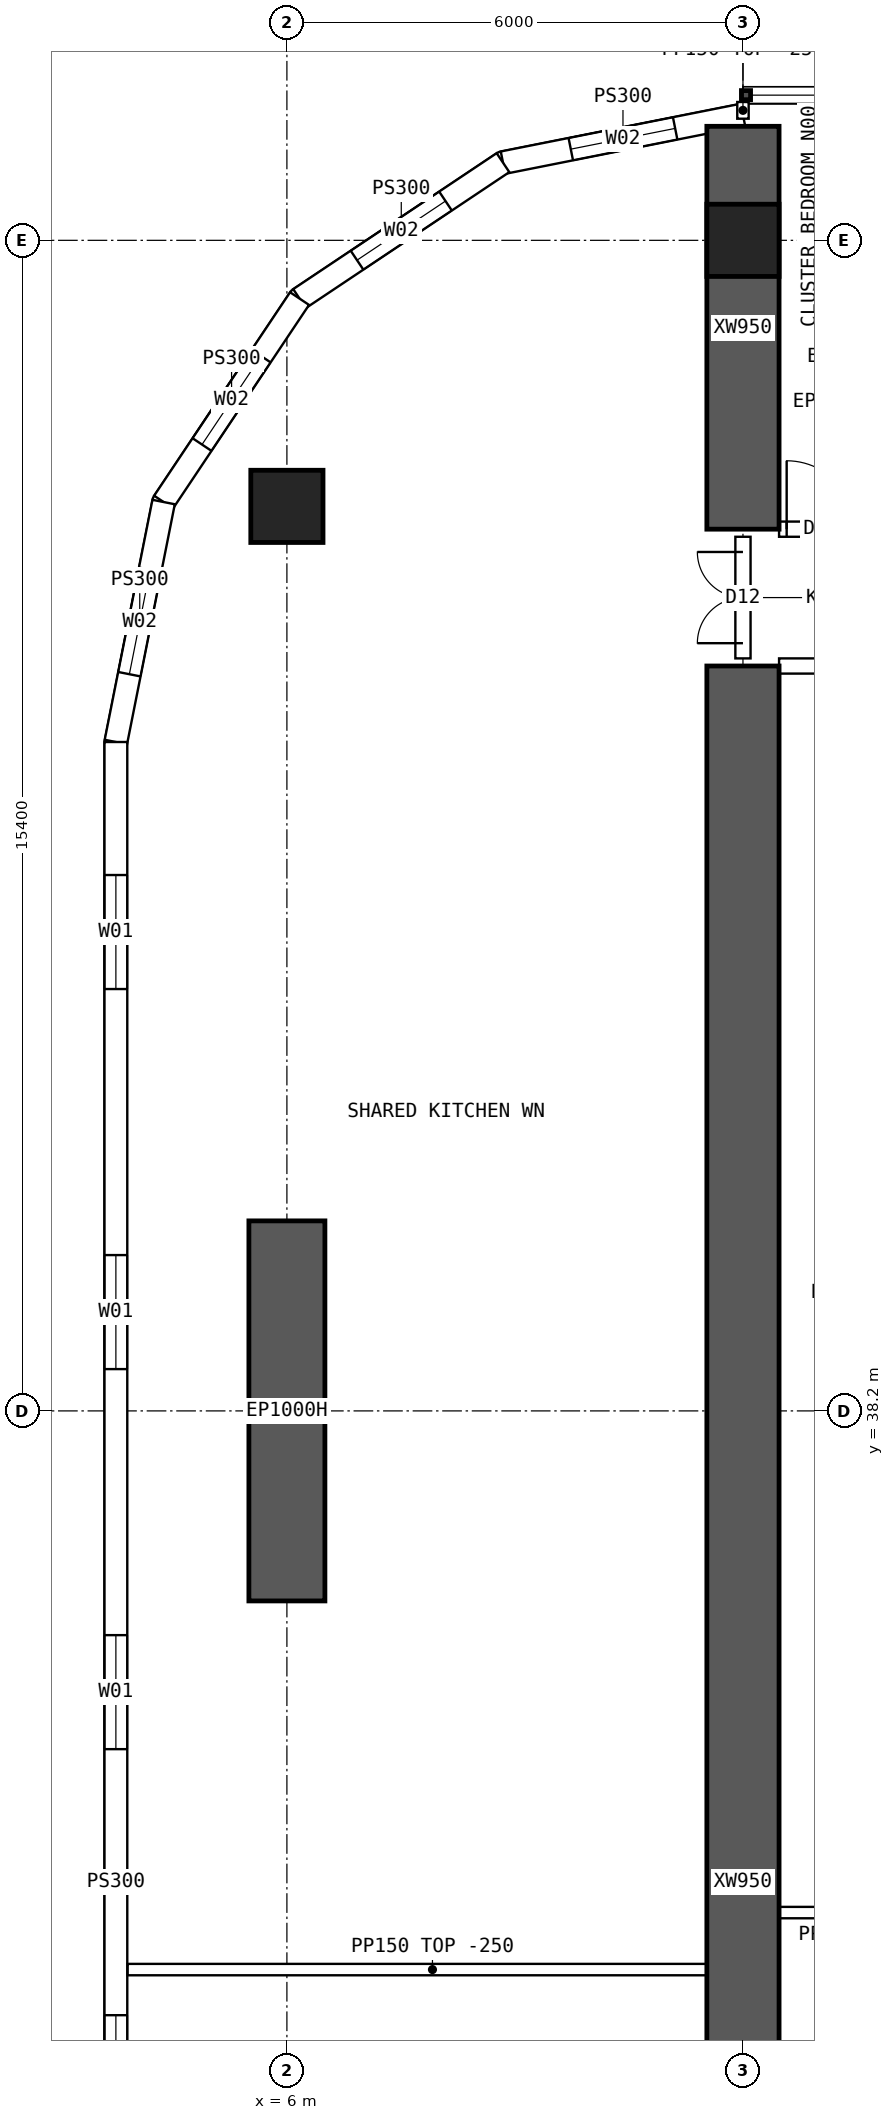
"""IFC4 building model, lengths in metres.
Left out: names, types, materials, properties, quantities, classifications, styles, units other than length and angle.
Written with IfcOpenShell. Run it as: python <this file> out.ifc"""

import sys

from ifc_helpers import new_model, si_unit, direction, frame, frame_2d, origin, origin_2d, place, context, subcontext, project, spatial, polyline, rectangle, hollow_rectangle, outline, extrude, element, fill, save


model = new_model("IFC4")
c1 = context("Model", 3, precision=1e-05, world=origin(), true_north=direction((0.0, 1.0)))
c2 = subcontext(c1, "Body", "Model", "MODEL_VIEW")
j1 = project(units=[si_unit("LENGTHUNIT", "METRE"), si_unit("PLANEANGLEUNIT", "RADIAN")], contexts=[c1])
p1 = place(None, origin())
s1 = spatial("IfcSite", under=j1, at=p1, CompositionType="ELEMENT")
p2 = place(p1, origin())
s2 = spatial("IfcBuilding", under=s1, at=p2, CompositionType="ELEMENT")
p3 = place(p2, frame((0.0, 0.0, 121.9)))
s3 = spatial("IfcBuildingStorey", under=s2, at=p3, CompositionType="ELEMENT", Elevation=121.9)
for number, where, z_axis, x_axis in (
    (1, (12.0, 53.6, 0.0), (0.0, 0.0, 1.0), (1.0, 0.0, 0.0)),
    (2, (6.0, 50.1, 0.0), (0.0, 0.0, 1.0), (1.0, 0.0, 0.0)),
):
    element("IfcColumn", number, at=place(p3, frame(where, z_axis=z_axis, x_axis=x_axis)), inside=s3, PredefinedType="COLUMN", context=c2, shape_type="SweptSolid", body=[
        extrude(hollow_rectangle(XDim=0.95, YDim=0.95, WallThickness=0.095, at=origin_2d()), origin(), (0.0, 0.0, 1.0), 3.75),
    ])
p4 = place(p3, frame((6.0, 35.7, 0.0), z_axis=(0.0, 0.0, 1.0), x_axis=(0.0, 1.0, 0.0)))
e3 = element("IfcWall", 3, at=p4, inside=s3, PredefinedType="SHEAR", context=c2, shape_type="SweptSolid", body=[
    extrude(rectangle(XDim=5.0, YDim=1.0, at=frame_2d((2.5, 0.0))), origin(), (0.0, 0.0, 1.0), 3.75),
])
p5 = place(p3, frame((12.0, 49.8, 0.0), z_axis=(0.0, 0.0, 1.0), x_axis=(0.0, 1.0, 0.0)))
e4 = element("IfcWall", 4, at=p5, inside=s3, PredefinedType="SHEAR", context=c2, shape_type="SweptSolid", body=[
    extrude(rectangle(XDim=5.3, YDim=0.95, at=frame_2d((2.65, 0.0))), origin(), (0.0, 0.0, 1.0), 3.75),
])
p6 = place(p3, frame((12.0, 16.0, 0.0), z_axis=(0.0, 0.0, 1.0), x_axis=(0.0, 1.0, 0.0)))
e5 = element("IfcWall", 5, at=p6, inside=s3, PredefinedType="SHEAR", context=c2, shape_type="SweptSolid", body=[
    extrude(rectangle(XDim=32.0, YDim=0.95, at=frame_2d((16.0, 0.0))), origin(), (0.0, 0.0, 1.0), 3.75),
])
p7 = place(p3, frame((3.75, 47.0, 0.0), z_axis=(0.0, 0.0, 1.0), x_axis=(0.0, -1.0, 0.0)))
e6 = element("IfcWall", 6, at=p7, inside=s3, PredefinedType="SOLIDWALL", context=c2, shape_type="SweptSolid", body=[
    extrude(outline(polyline([(-0.015, -0.15), (30.015, -0.15), (29.985, 0.15), (0.015, 0.15), (-0.015, -0.15)])), origin(), (0.0, 0.0, 1.0), 3.5),
])
p8 = place(p7, frame((1.75, 0.0, 0.9)))
e7 = element("IfcOpeningElement", 7, at=p8, cuts=e6, PredefinedType="OPENING", context=c2, shape_type="SweptSolid", body=[
    extrude(rectangle(XDim=1.5, YDim=2.0, at=frame_2d((0.75, 1.0))), frame((0.0, 0.16, 0.0), z_axis=(0.0, -1.0, 0.0), x_axis=(1.0, 0.0, 0.0)), (0.0, 0.0, 1.0), 0.32),
])
p9 = place(p7, frame((6.75, 0.0, 0.9)))
e8 = element("IfcOpeningElement", 8, at=p9, cuts=e6, PredefinedType="OPENING", context=c2, shape_type="SweptSolid", body=[
    extrude(rectangle(XDim=1.5, YDim=2.0, at=frame_2d((0.75, 1.0))), frame((0.0, 0.16, 0.0), z_axis=(0.0, -1.0, 0.0), x_axis=(1.0, 0.0, 0.0)), (0.0, 0.0, 1.0), 0.32),
])
p10 = place(p7, frame((11.75, 0.0, 0.9)))
e9 = element("IfcOpeningElement", 9, at=p10, cuts=e6, PredefinedType="OPENING", context=c2, shape_type="SweptSolid", body=[
    extrude(rectangle(XDim=1.5, YDim=2.0, at=frame_2d((0.75, 1.0))), frame((0.0, 0.16, 0.0), z_axis=(0.0, -1.0, 0.0), x_axis=(1.0, 0.0, 0.0)), (0.0, 0.0, 1.0), 0.32),
])
p11 = place(p7, frame((16.75, 0.0, 0.9)))
e10 = element("IfcOpeningElement", 10, at=p11, cuts=e6, PredefinedType="OPENING", context=c2, shape_type="SweptSolid", body=[
    extrude(rectangle(XDim=1.5, YDim=2.0, at=frame_2d((0.75, 1.0))), frame((0.0, 0.16, 0.0), z_axis=(0.0, -1.0, 0.0), x_axis=(1.0, 0.0, 0.0)), (0.0, 0.0, 1.0), 0.32),
])
p12 = place(p7, frame((21.75, 0.0, 0.9)))
e11 = element("IfcOpeningElement", 11, at=p12, cuts=e6, PredefinedType="OPENING", context=c2, shape_type="SweptSolid", body=[
    extrude(rectangle(XDim=1.5, YDim=2.0, at=frame_2d((0.75, 1.0))), frame((0.0, 0.16, 0.0), z_axis=(0.0, -1.0, 0.0), x_axis=(1.0, 0.0, 0.0)), (0.0, 0.0, 1.0), 0.32),
])
p13 = place(p7, frame((26.75, 0.0, 0.9)))
e12 = element("IfcOpeningElement", 12, at=p13, cuts=e6, PredefinedType="OPENING", context=c2, shape_type="SweptSolid", body=[
    extrude(rectangle(XDim=1.5, YDim=2.0, at=frame_2d((0.75, 1.0))), frame((0.0, 0.16, 0.0), z_axis=(0.0, -1.0, 0.0), x_axis=(1.0, 0.0, 0.0)), (0.0, 0.0, 1.0), 0.32),
])
p14 = place(p3, frame((12.0, 55.25, 0.0), z_axis=(0.0, 0.0, 1.0), x_axis=(-0.980787251524, -0.195080412259, 0.0)))
e13 = element("IfcWall", 13, at=p14, inside=s3, PredefinedType="SOLIDWALL", context=c2, shape_type="SweptSolid", body=[
    extrude(outline(polyline([(-0.03, -0.15), (3.249, -0.15), (3.189, 0.15), (0.03, 0.15), (-0.03, -0.15)])), origin(), (0.0, 0.0, 1.0), 3.5),
])
p15 = place(p14, frame((0.909, 0.0, 0.9)))
e14 = element("IfcOpeningElement", 14, at=p15, cuts=e13, PredefinedType="OPENING", context=c2, shape_type="SweptSolid", body=[
    extrude(rectangle(XDim=1.4, YDim=1.8, at=frame_2d((0.7, 0.9))), frame((0.0, 0.16, 0.0), z_axis=(0.0, -1.0, 0.0), x_axis=(1.0, 0.0, 0.0)), (0.0, 0.0, 1.0), 0.32),
])
p16 = place(p3, frame((8.843, 54.622, 0.0), z_axis=(0.0, 0.0, 1.0), x_axis=(-0.831443069936, -0.555609954424, 0.0)))
e15 = element("IfcWall", 15, at=p16, inside=s3, PredefinedType="SOLIDWALL", context=c2, shape_type="SweptSolid", body=[
    extrude(outline(polyline([(-0.03, -0.15), (3.249, -0.15), (3.189, 0.15), (0.03, 0.15), (-0.03, -0.15)])), origin(), (0.0, 0.0, 1.0), 3.5),
])
p17 = place(p16, frame((0.909, 0.0, 0.9)))
e16 = element("IfcOpeningElement", 16, at=p17, cuts=e15, PredefinedType="OPENING", context=c2, shape_type="SweptSolid", body=[
    extrude(rectangle(XDim=1.4, YDim=1.8, at=frame_2d((0.7, 0.9))), frame((0.0, 0.16, 0.0), z_axis=(0.0, -1.0, 0.0), x_axis=(1.0, 0.0, 0.0)), (0.0, 0.0, 1.0), 0.32),
])
p18 = place(p3, frame((6.167, 52.833, 0.0), z_axis=(0.0, 0.0, 1.0), x_axis=(-0.555609954424, -0.831443069936, 0.0)))
e17 = element("IfcWall", 17, at=p18, inside=s3, PredefinedType="SOLIDWALL", context=c2, shape_type="SweptSolid", body=[
    extrude(outline(polyline([(-0.03, -0.15), (3.249, -0.15), (3.189, 0.15), (0.03, 0.15), (-0.03, -0.15)])), origin(), (0.0, 0.0, 1.0), 3.5),
])
p19 = place(p18, frame((0.909, 0.0, 0.9)))
e18 = element("IfcOpeningElement", 18, at=p19, cuts=e17, PredefinedType="OPENING", context=c2, shape_type="SweptSolid", body=[
    extrude(rectangle(XDim=1.4, YDim=1.8, at=frame_2d((0.7, 0.9))), frame((0.0, 0.16, 0.0), z_axis=(0.0, -1.0, 0.0), x_axis=(1.0, 0.0, 0.0)), (0.0, 0.0, 1.0), 0.32),
])
p20 = place(p3, frame((4.378, 50.157, 0.0), z_axis=(0.0, 0.0, 1.0), x_axis=(-0.195080412259, -0.980787251524, 0.0)))
e19 = element("IfcWall", 19, at=p20, inside=s3, PredefinedType="SOLIDWALL", context=c2, shape_type="SweptSolid", body=[
    extrude(outline(polyline([(-0.03, -0.15), (3.234, -0.15), (3.204, 0.15), (0.03, 0.15), (-0.03, -0.15)])), origin(), (0.0, 0.0, 1.0), 3.5),
])
p21 = place(p20, frame((0.909, 0.0, 0.9)))
e20 = element("IfcOpeningElement", 20, at=p21, cuts=e19, PredefinedType="OPENING", context=c2, shape_type="SweptSolid", body=[
    extrude(rectangle(XDim=1.4, YDim=1.8, at=frame_2d((0.7, 0.9))), frame((0.0, 0.16, 0.0), z_axis=(0.0, -1.0, 0.0), x_axis=(1.0, 0.0, 0.0)), (0.0, 0.0, 1.0), 0.32),
])
p22 = place(p3, frame((12.475, 49.8, 0.0), z_axis=(0.0, 0.0, 1.0), x_axis=(1.0, 0.0, 0.0)))
e21 = element("IfcWall", 21, at=p22, inside=s3, PredefinedType="SOLIDWALL", context=c2, shape_type="SweptSolid", body=[
    extrude(outline(polyline([(0.0, 0.0), (5.05, 0.0), (5.05, 3.1), (0.0, 3.1), (0.0, 0.0)])), frame((0.0, 0.1, 0.0), z_axis=(0.0, -1.0, 0.0), x_axis=(1.0, 0.0, 0.0)), (0.0, 0.0, 1.0), 0.2),
])
p23 = place(p22, frame((0.1, 0.0, 0.0)))
e22 = element("IfcOpeningElement", 22, at=p23, cuts=e21, PredefinedType="OPENING", context=c2, shape_type="SweptSolid", body=[
    extrude(rectangle(XDim=0.9, YDim=2.1, at=frame_2d((0.45, 1.05))), frame((0.0, 0.11, 0.0), z_axis=(0.0, -1.0, 0.0), x_axis=(1.0, 0.0, 0.0)), (0.0, 0.0, 1.0), 0.22),
])
p24 = place(p22, frame((3.9, 0.0, 0.0)))
e23 = element("IfcOpeningElement", 23, at=p24, cuts=e21, PredefinedType="OPENING", context=c2, shape_type="SweptSolid", body=[
    extrude(rectangle(XDim=0.9, YDim=2.1, at=frame_2d((0.45, 1.05))), frame((0.0, 0.11, 0.0), z_axis=(0.0, -1.0, 0.0), x_axis=(1.0, 0.0, 0.0)), (0.0, 0.0, 1.0), 0.22),
])
p25 = place(p3, frame((12.475, 48.0, 0.0), z_axis=(0.0, 0.0, 1.0), x_axis=(1.0, 0.0, 0.0)))
e24 = element("IfcWall", 24, at=p25, inside=s3, PredefinedType="SOLIDWALL", context=c2, shape_type="SweptSolid", body=[
    extrude(rectangle(XDim=5.05, YDim=0.2, at=frame_2d((2.525, 0.0))), origin(), (0.0, 0.0, 1.0), 3.5),
])
p26 = place(p25, frame((3.325, 0.0, 0.0)))
e25 = element("IfcOpeningElement", 25, at=p26, cuts=e24, PredefinedType="OPENING", context=c2, shape_type="SweptSolid", body=[
    extrude(rectangle(XDim=1.6, YDim=2.1, at=frame_2d((0.8, 1.05))), frame((0.0, 0.11, 0.0), z_axis=(0.0, -1.0, 0.0), x_axis=(1.0, 0.0, 0.0)), (0.0, 0.0, 1.0), 0.22),
])
p27 = place(p3, frame((12.0, 31.6, 0.0), z_axis=(0.0, 0.0, 1.0), x_axis=(1.0, 0.0, 0.0)))
e26 = element("IfcWall", 26, at=p27, inside=s3, PredefinedType="PARTITIONING", context=c2, shape_type="SweptSolid", body=[
    extrude(rectangle(XDim=3.6, YDim=0.15, at=frame_2d((1.8, 0.0))), origin(), (0.0, 0.0, 1.0), 3.5),
])
p28 = place(p3, frame((3.905, 30.85, 0.0), z_axis=(0.0, 0.0, 1.0), x_axis=(1.0, 0.0, 0.0)))
e27 = element("IfcWall", 27, at=p28, inside=s3, PredefinedType="PARTITIONING", context=c2, shape_type="SweptSolid", body=[
    extrude(outline(polyline([(0.0, 0.0), (8.02, 0.0), (8.02, 3.5), (2.397, 3.5), (2.395, 3.05), (1.797, 3.05), (1.795, 3.5), (0.0, 3.5), (0.0, 0.0)])), frame((0.0, 0.075, 0.0), z_axis=(0.0, -1.0, 0.0), x_axis=(1.0, 0.0, 0.0)), (0.0, 0.0, 1.0), 0.15),
])
p29 = place(p3, frame((12.0, 48.1, 0.0), z_axis=(0.0, 0.0, 1.0), x_axis=(0.0, 1.0, 0.0)))
e28 = element("IfcWall", 28, at=p29, inside=s3, PredefinedType="SOLIDWALL", context=c2, shape_type="SweptSolid", body=[
    extrude(outline(polyline([(0.0, 0.0), (1.6, 0.0), (1.6, 3.1), (0.0, 3.1), (0.0, 0.0)])), frame((0.0, 0.1, 0.0), z_axis=(0.0, -1.0, 0.0), x_axis=(1.0, 0.0, 0.0)), (0.0, 0.0, 1.0), 0.2),
])
p30 = place(p29, frame((0.2, 0.0, 0.0)))
e29 = element("IfcOpeningElement", 29, at=p30, cuts=e28, PredefinedType="OPENING", context=c2, shape_type="SweptSolid", body=[
    extrude(rectangle(XDim=1.2, YDim=2.1, at=frame_2d((0.6, 1.05))), frame((0.0, 0.11, 0.0), z_axis=(0.0, -1.0, 0.0), x_axis=(1.0, 0.0, 0.0)), (0.0, 0.0, 1.0), 0.22),
])
p31 = place(p3, frame((12.0, 55.2, 0.0), z_axis=(0.0, 0.0, 1.0), x_axis=(0.0, 1.0, 0.0)))
e30 = element("IfcWall", 30, at=p31, inside=s3, PredefinedType="PARTITIONING", context=c2, shape_type="SweptSolid", body=[
    extrude(rectangle(XDim=0.22, YDim=0.15, at=frame_2d((0.11, 0.0))), origin(), (0.0, 0.0, 1.0), 3.5),
])
p32 = place(p8, origin())
e31 = element("IfcWindow", 31, at=p32, inside=s3, PartitioningType="SINGLE_PANEL", PredefinedType="WINDOW", context=c2, shape_type="SweptSolid", body=[
    extrude(rectangle(XDim=1.5, YDim=2.0, at=frame_2d((0.75, 1.0))), frame((0.0, 0.03, 0.0), z_axis=(0.0, -1.0, 0.0), x_axis=(1.0, 0.0, 0.0)), (0.0, 0.0, 1.0), 0.06),
])
fill(e7, e31)
p33 = place(p9, origin())
e32 = element("IfcWindow", 32, at=p33, inside=s3, PartitioningType="SINGLE_PANEL", PredefinedType="WINDOW", context=c2, shape_type="SweptSolid", body=[
    extrude(rectangle(XDim=1.5, YDim=2.0, at=frame_2d((0.75, 1.0))), frame((0.0, 0.03, 0.0), z_axis=(0.0, -1.0, 0.0), x_axis=(1.0, 0.0, 0.0)), (0.0, 0.0, 1.0), 0.06),
])
fill(e8, e32)
p34 = place(p10, origin())
e33 = element("IfcWindow", 33, at=p34, inside=s3, PartitioningType="SINGLE_PANEL", PredefinedType="WINDOW", context=c2, shape_type="SweptSolid", body=[
    extrude(rectangle(XDim=1.5, YDim=2.0, at=frame_2d((0.75, 1.0))), frame((0.0, 0.03, 0.0), z_axis=(0.0, -1.0, 0.0), x_axis=(1.0, 0.0, 0.0)), (0.0, 0.0, 1.0), 0.06),
])
fill(e9, e33)
p35 = place(p11, origin())
e34 = element("IfcWindow", 34, at=p35, inside=s3, PartitioningType="SINGLE_PANEL", PredefinedType="WINDOW", context=c2, shape_type="SweptSolid", body=[
    extrude(rectangle(XDim=1.5, YDim=2.0, at=frame_2d((0.75, 1.0))), frame((0.0, 0.03, 0.0), z_axis=(0.0, -1.0, 0.0), x_axis=(1.0, 0.0, 0.0)), (0.0, 0.0, 1.0), 0.06),
])
fill(e10, e34)
p36 = place(p15, origin())
e35 = element("IfcWindow", 35, at=p36, inside=s3, PartitioningType="SINGLE_PANEL", PredefinedType="WINDOW", context=c2, shape_type="SweptSolid", body=[
    extrude(rectangle(XDim=1.4, YDim=1.8, at=frame_2d((0.7, 0.9))), frame((0.0, 0.03, 0.0), z_axis=(0.0, -1.0, 0.0), x_axis=(1.0, 0.0, 0.0)), (0.0, 0.0, 1.0), 0.06),
])
fill(e14, e35)
p37 = place(p17, origin())
e36 = element("IfcWindow", 36, at=p37, inside=s3, PartitioningType="SINGLE_PANEL", PredefinedType="WINDOW", context=c2, shape_type="SweptSolid", body=[
    extrude(rectangle(XDim=1.4, YDim=1.8, at=frame_2d((0.7, 0.9))), frame((0.0, 0.03, 0.0), z_axis=(0.0, -1.0, 0.0), x_axis=(1.0, 0.0, 0.0)), (0.0, 0.0, 1.0), 0.06),
])
fill(e16, e36)
p38 = place(p19, origin())
e37 = element("IfcWindow", 37, at=p38, inside=s3, PartitioningType="SINGLE_PANEL", PredefinedType="WINDOW", context=c2, shape_type="SweptSolid", body=[
    extrude(rectangle(XDim=1.4, YDim=1.8, at=frame_2d((0.7, 0.9))), frame((0.0, 0.03, 0.0), z_axis=(0.0, -1.0, 0.0), x_axis=(1.0, 0.0, 0.0)), (0.0, 0.0, 1.0), 0.06),
])
fill(e18, e37)
p39 = place(p21, origin())
e38 = element("IfcWindow", 38, at=p39, inside=s3, PartitioningType="SINGLE_PANEL", PredefinedType="WINDOW", context=c2, shape_type="SweptSolid", body=[
    extrude(rectangle(XDim=1.4, YDim=1.8, at=frame_2d((0.7, 0.9))), frame((0.0, 0.03, 0.0), z_axis=(0.0, -1.0, 0.0), x_axis=(1.0, 0.0, 0.0)), (0.0, 0.0, 1.0), 0.06),
])
fill(e20, e38)
p40 = place(p23, origin())
e39 = element("IfcDoor", 39, at=p40, inside=s3, OperationType="SINGLE_SWING_LEFT", PredefinedType="DOOR", context=c2, shape_type="SweptSolid", body=[
    extrude(rectangle(XDim=0.9, YDim=2.1, at=frame_2d((0.45, 1.05))), frame((0.0, 0.025, 0.0), z_axis=(0.0, -1.0, 0.0), x_axis=(1.0, 0.0, 0.0)), (0.0, 0.0, 1.0), 0.05),
])
fill(e22, e39)
p41 = place(p30, origin())
e40 = element("IfcDoor", 40, at=p41, inside=s3, OperationType="DOUBLE_DOOR_SINGLE_SWING", PredefinedType="DOOR", context=c2, shape_type="SweptSolid", body=[
    extrude(rectangle(XDim=1.2, YDim=2.1, at=frame_2d((0.6, 1.05))), frame((0.0, 0.025, 0.0), z_axis=(0.0, -1.0, 0.0), x_axis=(1.0, 0.0, 0.0)), (0.0, 0.0, 1.0), 0.05),
])
fill(e29, e40)
save(model, sys.argv[1])
